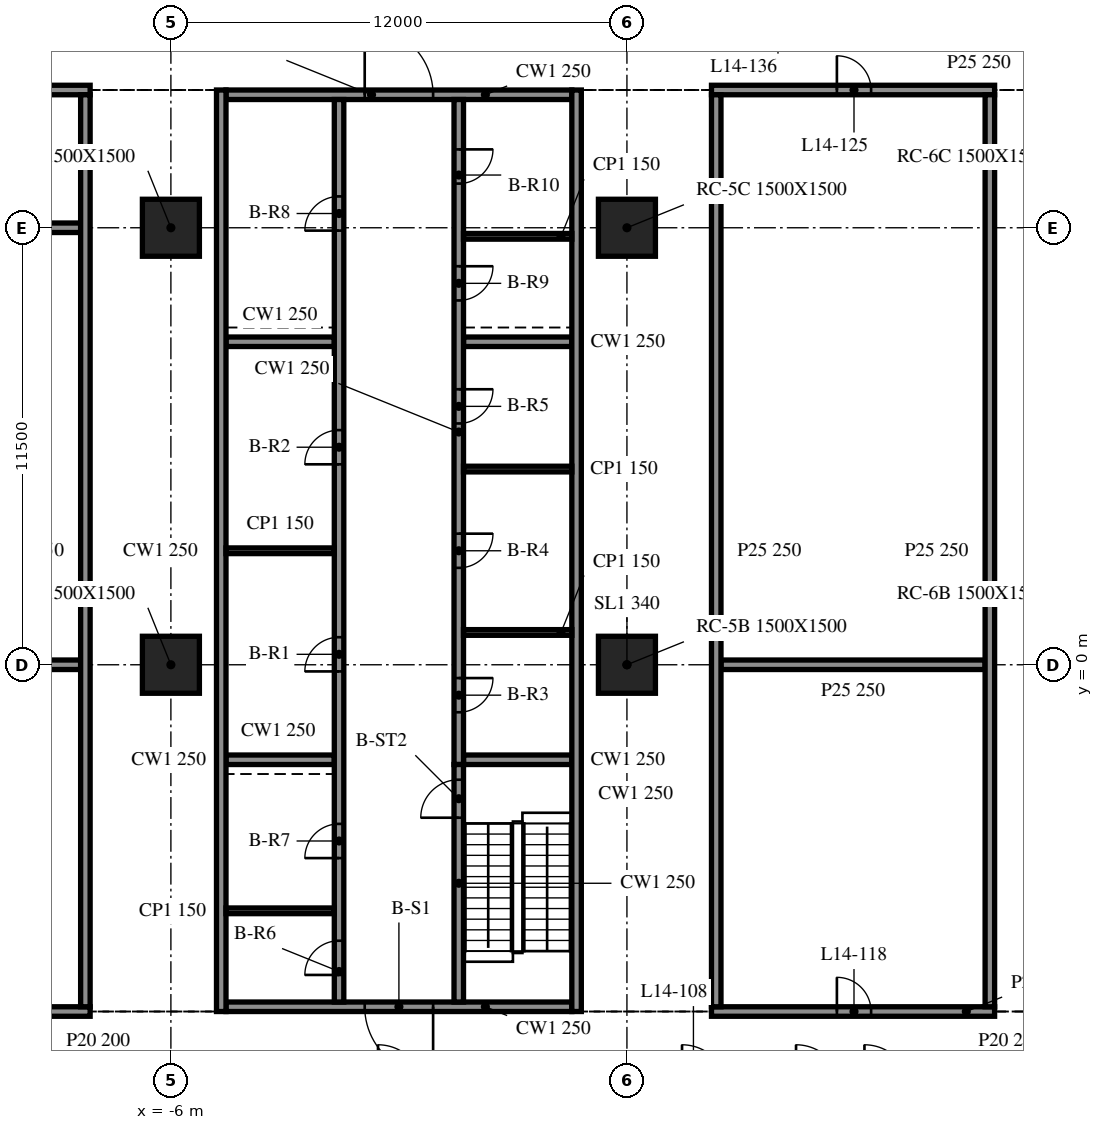
"""IFC4 building model, lengths in metres.
Left out: names, types, materials, properties, quantities, classifications, styles, units other than length and angle.
Written with IfcOpenShell. Run it as: python <this file> out.ifc"""

import sys

from ifc_helpers import new_model, si_unit, direction, frame, frame_2d, origin, origin_2d, place, context, subcontext, project, spatial, rectangle, extrude, element, fill, save


model = new_model("IFC4")
c1 = context("Model", 3, precision=1e-05, world=origin(), true_north=direction((0.0, 1.0)))
c2 = subcontext(c1, "Body", "Model", "MODEL_VIEW")
j1 = project(units=[si_unit("LENGTHUNIT", "METRE"), si_unit("PLANEANGLEUNIT", "RADIAN")], contexts=[c1])
p1 = place(None, origin())
s1 = spatial("IfcSite", under=j1, at=p1, CompositionType="ELEMENT")
p2 = place(p1, origin())
s2 = spatial("IfcBuilding", under=s1, at=p2, CompositionType="ELEMENT")
p3 = place(p2, frame((0.0, 0.0, 63.2)))
s3 = spatial("IfcBuildingStorey", under=s2, at=p3, CompositionType="ELEMENT", Elevation=63.2)
for number, where, z_axis, x_axis in (
    (1, (-6.0, 0.0, -0.34), (0.0, 0.0, 1.0), (1.0, 0.0, 0.0)),
    (2, (-6.0, 11.5, -0.34), (0.0, 0.0, 1.0), (1.0, 0.0, 0.0)),
    (3, (6.0, 0.0, -0.34), (0.0, 0.0, 1.0), (1.0, 0.0, 0.0)),
    (4, (6.0, 11.5, -0.34), (0.0, 0.0, 1.0), (1.0, 0.0, 0.0)),
):
    element("IfcColumn", number, at=place(p3, frame(where, z_axis=z_axis, x_axis=x_axis)), inside=s3, PredefinedType="COLUMN", context=c2, shape_type="SweptSolid", body=[
        extrude(rectangle(XDim=1.5, YDim=1.5, at=origin_2d()), origin(), (0.0, 0.0, 1.0), 4.3),
    ])
for number, where, z_axis, x_axis in (
    (5, (-4.675, 15.125, 0.0), (0.0, 0.0, 1.0), (0.0, -1.0, 0.0)),
    (6, (4.675, -9.125, 0.0), (0.0, 0.0, 1.0), (0.0, 1.0, 0.0)),
):
    element("IfcWall", number, at=place(p3, frame(where, z_axis=z_axis, x_axis=x_axis)), inside=s3, PredefinedType="SOLIDWALL", context=c2, shape_type="SweptSolid", body=[
        extrude(rectangle(XDim=24.25, YDim=0.25, at=frame_2d((12.125, 0.0))), origin(), (0.0, 0.0, 1.0), 3.96),
    ])
p4 = place(p3, frame((4.55, -9.0, 0.0), z_axis=(0.0, 0.0, 1.0), x_axis=(-1.0, 0.0, 0.0)))
e7 = element("IfcWall", 7, at=p4, inside=s3, PredefinedType="SOLIDWALL", context=c2, shape_type="SweptSolid", body=[
    extrude(rectangle(XDim=9.1, YDim=0.25, at=frame_2d((4.55, 0.0))), origin(), (0.0, 0.0, 1.0), 3.96),
])
p5 = place(p4, frame((3.65, 0.0, 0.0)))
e8 = element("IfcOpeningElement", 8, at=p5, cuts=e7, PredefinedType="OPENING", context=c2, shape_type="SweptSolid", body=[
    extrude(rectangle(XDim=1.8, YDim=2.1, at=frame_2d((0.9, 1.05))), frame((0.0, 0.135, 0.0), z_axis=(0.0, -1.0, 0.0), x_axis=(1.0, 0.0, 0.0)), (0.0, 0.0, 1.0), 0.27),
])
p6 = place(p3, frame((-4.55, 15.0, 0.0), z_axis=(0.0, 0.0, 1.0), x_axis=(1.0, 0.0, 0.0)))
e9 = element("IfcWall", 9, at=p6, inside=s3, PredefinedType="SOLIDWALL", context=c2, shape_type="SweptSolid", body=[
    extrude(rectangle(XDim=9.1, YDim=0.25, at=frame_2d((4.55, 0.0))), origin(), (0.0, 0.0, 1.0), 3.96),
])
p7 = place(p6, frame((3.65, 0.0, 0.0)))
e10 = element("IfcOpeningElement", 10, at=p7, cuts=e9, PredefinedType="OPENING", context=c2, shape_type="SweptSolid", body=[
    extrude(rectangle(XDim=1.8, YDim=2.1, at=frame_2d((0.9, 1.05))), frame((0.0, 0.135, 0.0), z_axis=(0.0, -1.0, 0.0), x_axis=(1.0, 0.0, 0.0)), (0.0, 0.0, 1.0), 0.27),
])
p8 = place(p3, frame((-1.575, -8.875, 0.0), z_axis=(0.0, 0.0, 1.0), x_axis=(0.0, 1.0, 0.0)))
e11 = element("IfcWall", 11, at=p8, inside=s3, PredefinedType="SOLIDWALL", context=c2, shape_type="SweptSolid", body=[
    extrude(rectangle(XDim=23.75, YDim=0.25, at=frame_2d((11.875, 0.0))), origin(), (0.0, 0.0, 1.0), 3.96),
])
p9 = place(p8, frame((8.7, 0.0, 0.0)))
e12 = element("IfcOpeningElement", 12, at=p9, cuts=e11, PredefinedType="OPENING", context=c2, shape_type="SweptSolid", body=[
    extrude(rectangle(XDim=0.9, YDim=2.1, at=frame_2d((0.45, 1.05))), frame((0.0, 0.135, 0.0), z_axis=(0.0, -1.0, 0.0), x_axis=(1.0, 0.0, 0.0)), (0.0, 0.0, 1.0), 0.27),
])
p10 = place(p8, frame((14.15, 0.0, 0.0)))
e13 = element("IfcOpeningElement", 13, at=p10, cuts=e11, PredefinedType="OPENING", context=c2, shape_type="SweptSolid", body=[
    extrude(rectangle(XDim=0.9, YDim=2.1, at=frame_2d((0.45, 1.05))), frame((0.0, 0.135, 0.0), z_axis=(0.0, -1.0, 0.0), x_axis=(1.0, 0.0, 0.0)), (0.0, 0.0, 1.0), 0.27),
])
p11 = place(p8, frame((0.712, 0.0, 0.0)))
e14 = element("IfcOpeningElement", 14, at=p11, cuts=e11, PredefinedType="OPENING", context=c2, shape_type="SweptSolid", body=[
    extrude(rectangle(XDim=0.9, YDim=2.1, at=frame_2d((0.45, 1.05))), frame((0.0, 0.135, 0.0), z_axis=(0.0, -1.0, 0.0), x_axis=(1.0, 0.0, 0.0)), (0.0, 0.0, 1.0), 0.27),
])
p12 = place(p8, frame((3.788, 0.0, 0.0)))
e15 = element("IfcOpeningElement", 15, at=p12, cuts=e11, PredefinedType="OPENING", context=c2, shape_type="SweptSolid", body=[
    extrude(rectangle(XDim=0.9, YDim=2.1, at=frame_2d((0.45, 1.05))), frame((0.0, 0.135, 0.0), z_axis=(0.0, -1.0, 0.0), x_axis=(1.0, 0.0, 0.0)), (0.0, 0.0, 1.0), 0.27),
])
p13 = place(p8, frame((20.3, 0.0, 0.0)))
e16 = element("IfcOpeningElement", 16, at=p13, cuts=e11, PredefinedType="OPENING", context=c2, shape_type="SweptSolid", body=[
    extrude(rectangle(XDim=0.9, YDim=2.1, at=frame_2d((0.45, 1.05))), frame((0.0, 0.135, 0.0), z_axis=(0.0, -1.0, 0.0), x_axis=(1.0, 0.0, 0.0)), (0.0, 0.0, 1.0), 0.27),
])
p14 = place(p3, frame((1.575, -8.875, 0.0), z_axis=(0.0, 0.0, 1.0), x_axis=(0.0, 1.0, 0.0)))
e17 = element("IfcWall", 17, at=p14, inside=s3, PredefinedType="SOLIDWALL", context=c2, shape_type="SweptSolid", body=[
    extrude(rectangle(XDim=6.25, YDim=0.25, at=frame_2d((3.125, 0.0))), origin(), (0.0, 0.0, 1.0), 3.96),
])
p15 = place(p14, frame((4.85, 0.0, 0.0)))
e18 = element("IfcOpeningElement", 18, at=p15, cuts=e17, PredefinedType="OPENING", context=c2, shape_type="SweptSolid", body=[
    extrude(rectangle(XDim=1.0, YDim=2.1, at=frame_2d((0.5, 1.05))), frame((0.0, 0.135, 0.0), z_axis=(0.0, -1.0, 0.0), x_axis=(1.0, 0.0, 0.0)), (0.0, 0.0, 1.0), 0.27),
])
p16 = place(p3, frame((1.575, 14.875, 0.0), z_axis=(0.0, 0.0, 1.0), x_axis=(0.0, -1.0, 0.0)))
e19 = element("IfcWall", 19, at=p16, inside=s3, PredefinedType="SOLIDWALL", context=c2, shape_type="SweptSolid", body=[
    extrude(rectangle(XDim=17.5, YDim=0.25, at=frame_2d((8.75, 0.0))), origin(), (0.0, 0.0, 1.0), 3.96),
])
p17 = place(p16, frame((15.225, 0.0, 0.0)))
e20 = element("IfcOpeningElement", 20, at=p17, cuts=e19, PredefinedType="OPENING", context=c2, shape_type="SweptSolid", body=[
    extrude(rectangle(XDim=0.9, YDim=2.1, at=frame_2d((0.45, 1.05))), frame((0.0, 0.135, 0.0), z_axis=(0.0, -1.0, 0.0), x_axis=(1.0, 0.0, 0.0)), (0.0, 0.0, 1.0), 0.27),
])
p18 = place(p16, frame((11.425, 0.0, 0.0)))
e21 = element("IfcOpeningElement", 21, at=p18, cuts=e19, PredefinedType="OPENING", context=c2, shape_type="SweptSolid", body=[
    extrude(rectangle(XDim=0.9, YDim=2.1, at=frame_2d((0.45, 1.05))), frame((0.0, 0.135, 0.0), z_axis=(0.0, -1.0, 0.0), x_axis=(1.0, 0.0, 0.0)), (0.0, 0.0, 1.0), 0.27),
])
p19 = place(p16, frame((7.625, 0.0, 0.0)))
e22 = element("IfcOpeningElement", 22, at=p19, cuts=e19, PredefinedType="OPENING", context=c2, shape_type="SweptSolid", body=[
    extrude(rectangle(XDim=0.9, YDim=2.1, at=frame_2d((0.45, 1.05))), frame((0.0, 0.135, 0.0), z_axis=(0.0, -1.0, 0.0), x_axis=(1.0, 0.0, 0.0)), (0.0, 0.0, 1.0), 0.27),
])
p20 = place(p16, frame((4.387, 0.0, 0.0)))
e23 = element("IfcOpeningElement", 23, at=p20, cuts=e19, PredefinedType="OPENING", context=c2, shape_type="SweptSolid", body=[
    extrude(rectangle(XDim=0.9, YDim=2.1, at=frame_2d((0.45, 1.05))), frame((0.0, 0.135, 0.0), z_axis=(0.0, -1.0, 0.0), x_axis=(1.0, 0.0, 0.0)), (0.0, 0.0, 1.0), 0.27),
])
p21 = place(p16, frame((1.312, 0.0, 0.0)))
e24 = element("IfcOpeningElement", 24, at=p21, cuts=e19, PredefinedType="OPENING", context=c2, shape_type="SweptSolid", body=[
    extrude(rectangle(XDim=0.9, YDim=2.1, at=frame_2d((0.45, 1.05))), frame((0.0, 0.135, 0.0), z_axis=(0.0, -1.0, 0.0), x_axis=(1.0, 0.0, 0.0)), (0.0, 0.0, 1.0), 0.27),
])
for number, where, z_axis, x_axis in (
    (25, (-4.55, -2.5, 0.0), (0.0, 0.0, 1.0), (1.0, 0.0, 0.0)),
    (26, (-4.55, 8.5, 0.0), (0.0, 0.0, 1.0), (1.0, 0.0, 0.0)),
    (27, (1.7, -2.5, 0.0), (0.0, 0.0, 1.0), (1.0, 0.0, 0.0)),
    (28, (1.7, 8.5, 0.0), (0.0, 0.0, 1.0), (1.0, 0.0, 0.0)),
):
    element("IfcWall", number, at=place(p3, frame(where, z_axis=z_axis, x_axis=x_axis)), inside=s3, PredefinedType="SOLIDWALL", context=c2, shape_type="SweptSolid", body=[
        extrude(rectangle(XDim=2.85, YDim=0.25, at=frame_2d((1.425, 0.0))), origin(), (0.0, 0.0, 1.0), 3.96),
    ])
for number, where, z_axis, x_axis in (
    (29, (-4.55, 3.0, 0.0), (0.0, 0.0, 1.0), (1.0, 0.0, 0.0)),
    (30, (1.7, 0.85, 0.0), (0.0, 0.0, 1.0), (1.0, 0.0, 0.0)),
    (31, (1.7, 5.15, 0.0), (0.0, 0.0, 1.0), (1.0, 0.0, 0.0)),
    (32, (-4.55, -6.475, 0.0), (0.0, 0.0, 1.0), (1.0, 0.0, 0.0)),
    (33, (1.7, 11.275, 0.0), (0.0, 0.0, 1.0), (1.0, 0.0, 0.0)),
):
    element("IfcWall", number, at=place(p3, frame(where, z_axis=z_axis, x_axis=x_axis)), inside=s3, PredefinedType="PARTITIONING", context=c2, shape_type="SweptSolid", body=[
        extrude(rectangle(XDim=2.85, YDim=0.15, at=frame_2d((1.425, 0.0))), origin(), (0.0, 0.0, 1.0), 3.96),
    ])
p22 = place(p3, frame((-15.975, -9.125, 0.0), z_axis=(0.0, 0.0, 1.0), x_axis=(1.0, 0.0, 0.0)))
e34 = element("IfcWall", 34, at=p22, inside=s3, PredefinedType="PARTITIONING", context=c2, shape_type="SweptSolid", body=[
    extrude(rectangle(XDim=7.85, YDim=0.25, at=frame_2d((3.925, 0.0))), origin(), (0.0, 0.0, 1.0), 3.96),
])
p23 = place(p22, frame((3.5, 0.0, 0.0)))
e35 = element("IfcOpeningElement", 35, at=p23, cuts=e34, PredefinedType="OPENING", context=c2, shape_type="SweptSolid", body=[
    extrude(rectangle(XDim=0.9, YDim=2.1, at=frame_2d((0.45, 1.05))), frame((0.0, 0.135, 0.0), z_axis=(0.0, -1.0, 0.0), x_axis=(1.0, 0.0, 0.0)), (0.0, 0.0, 1.0), 0.27),
])
p24 = place(p3, frame((8.225, -9.125, 0.0), z_axis=(0.0, 0.0, 1.0), x_axis=(1.0, 0.0, 0.0)))
e36 = element("IfcWall", 36, at=p24, inside=s3, PredefinedType="PARTITIONING", context=c2, shape_type="SweptSolid", body=[
    extrude(rectangle(XDim=7.45, YDim=0.25, at=frame_2d((3.725, 0.0))), origin(), (0.0, 0.0, 1.0), 3.96),
])
p25 = place(p24, frame((3.3, 0.0, 0.0)))
e37 = element("IfcOpeningElement", 37, at=p25, cuts=e36, PredefinedType="OPENING", context=c2, shape_type="SweptSolid", body=[
    extrude(rectangle(XDim=0.9, YDim=2.1, at=frame_2d((0.45, 1.05))), frame((0.0, 0.135, 0.0), z_axis=(0.0, -1.0, 0.0), x_axis=(1.0, 0.0, 0.0)), (0.0, 0.0, 1.0), 0.27),
])
p26 = place(p3, frame((-15.725, 0.0, 0.0), z_axis=(0.0, 0.0, 1.0), x_axis=(1.0, 0.0, 0.0)))
e38 = element("IfcWall", 38, at=p26, inside=s3, PredefinedType="PARTITIONING", context=c2, shape_type="SweptSolid", body=[
    extrude(rectangle(XDim=7.35, YDim=0.25, at=frame_2d((3.675, 0.0))), origin(), (0.0, 0.0, 1.0), 3.96),
])
p27 = place(p3, frame((8.475, 0.0, 0.0), z_axis=(0.0, 0.0, 1.0), x_axis=(1.0, 0.0, 0.0)))
e39 = element("IfcWall", 39, at=p27, inside=s3, PredefinedType="PARTITIONING", context=c2, shape_type="SweptSolid", body=[
    extrude(rectangle(XDim=6.95, YDim=0.25, at=frame_2d((3.475, 0.0))), origin(), (0.0, 0.0, 1.0), 3.96),
])
p28 = place(p3, frame((-15.725, 11.5, 0.0), z_axis=(0.0, 0.0, 1.0), x_axis=(1.0, 0.0, 0.0)))
e40 = element("IfcWall", 40, at=p28, inside=s3, PredefinedType="PARTITIONING", context=c2, shape_type="SweptSolid", body=[
    extrude(rectangle(XDim=7.35, YDim=0.25, at=frame_2d((3.675, 0.0))), origin(), (0.0, 0.0, 1.0), 3.96),
])
p29 = place(p3, frame((-15.975, 15.125, 0.0), z_axis=(0.0, 0.0, 1.0), x_axis=(1.0, 0.0, 0.0)))
e41 = element("IfcWall", 41, at=p29, inside=s3, PredefinedType="PARTITIONING", context=c2, shape_type="SweptSolid", body=[
    extrude(rectangle(XDim=7.85, YDim=0.25, at=frame_2d((3.925, 0.0))), origin(), (0.0, 0.0, 1.0), 3.96),
])
p30 = place(p29, frame((3.5, 0.0, 0.0)))
e42 = element("IfcOpeningElement", 42, at=p30, cuts=e41, PredefinedType="OPENING", context=c2, shape_type="SweptSolid", body=[
    extrude(rectangle(XDim=0.9, YDim=2.1, at=frame_2d((0.45, 1.05))), frame((0.0, 0.135, 0.0), z_axis=(0.0, -1.0, 0.0), x_axis=(1.0, 0.0, 0.0)), (0.0, 0.0, 1.0), 0.27),
])
p31 = place(p3, frame((8.225, 15.125, 0.0), z_axis=(0.0, 0.0, 1.0), x_axis=(1.0, 0.0, 0.0)))
e43 = element("IfcWall", 43, at=p31, inside=s3, PredefinedType="PARTITIONING", context=c2, shape_type="SweptSolid", body=[
    extrude(rectangle(XDim=7.45, YDim=0.25, at=frame_2d((3.725, 0.0))), origin(), (0.0, 0.0, 1.0), 3.96),
])
p32 = place(p31, frame((3.3, 0.0, 0.0)))
e44 = element("IfcOpeningElement", 44, at=p32, cuts=e43, PredefinedType="OPENING", context=c2, shape_type="SweptSolid", body=[
    extrude(rectangle(XDim=0.9, YDim=2.1, at=frame_2d((0.45, 1.05))), frame((0.0, 0.135, 0.0), z_axis=(0.0, -1.0, 0.0), x_axis=(1.0, 0.0, 0.0)), (0.0, 0.0, 1.0), 0.27),
])
for number, where, z_axis, x_axis in (
    (45, (-8.25, -9.0, 0.0), (0.0, 0.0, 1.0), (0.0, 1.0, 0.0)),
    (46, (8.35, -9.0, 0.0), (0.0, 0.0, 1.0), (0.0, 1.0, 0.0)),
    (47, (15.55, -9.0, 0.0), (0.0, 0.0, 1.0), (0.0, 1.0, 0.0)),
):
    element("IfcWall", number, at=place(p3, frame(where, z_axis=z_axis, x_axis=x_axis)), inside=s3, PredefinedType="PARTITIONING", context=c2, shape_type="SweptSolid", body=[
        extrude(rectangle(XDim=24.0, YDim=0.25, at=frame_2d((12.0, 0.0))), origin(), (0.0, 0.0, 1.0), 3.96),
    ])
p33 = place(p5, origin())
e48 = element("IfcDoor", 48, at=p33, inside=s3, OperationType="DOUBLE_DOOR_SINGLE_SWING", PredefinedType="DOOR", context=c2, shape_type="SweptSolid", body=[
    extrude(rectangle(XDim=1.8, YDim=2.1, at=frame_2d((0.9, 1.05))), frame((0.0, 0.025, 0.0), z_axis=(0.0, -1.0, 0.0), x_axis=(1.0, 0.0, 0.0)), (0.0, 0.0, 1.0), 0.05),
])
fill(e8, e48)
p34 = place(p7, origin())
e49 = element("IfcDoor", 49, at=p34, inside=s3, OperationType="DOUBLE_DOOR_SINGLE_SWING", PredefinedType="DOOR", context=c2, shape_type="SweptSolid", body=[
    extrude(rectangle(XDim=1.8, YDim=2.1, at=frame_2d((0.9, 1.05))), frame((0.0, 0.025, 0.0), z_axis=(0.0, -1.0, 0.0), x_axis=(1.0, 0.0, 0.0)), (0.0, 0.0, 1.0), 0.05),
])
fill(e10, e49)
p35 = place(p9, origin())
e50 = element("IfcDoor", 50, at=p35, inside=s3, OperationType="SINGLE_SWING_LEFT", PredefinedType="DOOR", context=c2, shape_type="SweptSolid", body=[
    extrude(rectangle(XDim=0.9, YDim=2.1, at=frame_2d((0.45, 1.05))), frame((0.0, 0.025, 0.0), z_axis=(0.0, -1.0, 0.0), x_axis=(1.0, 0.0, 0.0)), (0.0, 0.0, 1.0), 0.05),
])
fill(e12, e50)
p36 = place(p10, origin())
e51 = element("IfcDoor", 51, at=p36, inside=s3, OperationType="SINGLE_SWING_RIGHT", PredefinedType="DOOR", context=c2, shape_type="SweptSolid", body=[
    extrude(rectangle(XDim=0.9, YDim=2.1, at=frame_2d((0.45, 1.05))), frame((0.0, 0.025, 0.0), z_axis=(0.0, -1.0, 0.0), x_axis=(1.0, 0.0, 0.0)), (0.0, 0.0, 1.0), 0.05),
])
fill(e13, e51)
p37 = place(p17, origin())
e52 = element("IfcDoor", 52, at=p37, inside=s3, OperationType="SINGLE_SWING_LEFT", PredefinedType="DOOR", context=c2, shape_type="SweptSolid", body=[
    extrude(rectangle(XDim=0.9, YDim=2.1, at=frame_2d((0.45, 1.05))), frame((0.0, 0.025, 0.0), z_axis=(0.0, -1.0, 0.0), x_axis=(1.0, 0.0, 0.0)), (0.0, 0.0, 1.0), 0.05),
])
fill(e20, e52)
p38 = place(p18, origin())
e53 = element("IfcDoor", 53, at=p38, inside=s3, OperationType="SINGLE_SWING_RIGHT", PredefinedType="DOOR", context=c2, shape_type="SweptSolid", body=[
    extrude(rectangle(XDim=0.9, YDim=2.1, at=frame_2d((0.45, 1.05))), frame((0.0, 0.025, 0.0), z_axis=(0.0, -1.0, 0.0), x_axis=(1.0, 0.0, 0.0)), (0.0, 0.0, 1.0), 0.05),
])
fill(e21, e53)
p39 = place(p19, origin())
e54 = element("IfcDoor", 54, at=p39, inside=s3, OperationType="SINGLE_SWING_LEFT", PredefinedType="DOOR", context=c2, shape_type="SweptSolid", body=[
    extrude(rectangle(XDim=0.9, YDim=2.1, at=frame_2d((0.45, 1.05))), frame((0.0, 0.025, 0.0), z_axis=(0.0, -1.0, 0.0), x_axis=(1.0, 0.0, 0.0)), (0.0, 0.0, 1.0), 0.05),
])
fill(e22, e54)
p40 = place(p11, origin())
e55 = element("IfcDoor", 55, at=p40, inside=s3, OperationType="SINGLE_SWING_RIGHT", PredefinedType="DOOR", context=c2, shape_type="SweptSolid", body=[
    extrude(rectangle(XDim=0.9, YDim=2.1, at=frame_2d((0.45, 1.05))), frame((0.0, 0.025, 0.0), z_axis=(0.0, -1.0, 0.0), x_axis=(1.0, 0.0, 0.0)), (0.0, 0.0, 1.0), 0.05),
])
fill(e14, e55)
p41 = place(p12, origin())
e56 = element("IfcDoor", 56, at=p41, inside=s3, OperationType="SINGLE_SWING_LEFT", PredefinedType="DOOR", context=c2, shape_type="SweptSolid", body=[
    extrude(rectangle(XDim=0.9, YDim=2.1, at=frame_2d((0.45, 1.05))), frame((0.0, 0.025, 0.0), z_axis=(0.0, -1.0, 0.0), x_axis=(1.0, 0.0, 0.0)), (0.0, 0.0, 1.0), 0.05),
])
fill(e15, e56)
p42 = place(p13, origin())
e57 = element("IfcDoor", 57, at=p42, inside=s3, OperationType="SINGLE_SWING_RIGHT", PredefinedType="DOOR", context=c2, shape_type="SweptSolid", body=[
    extrude(rectangle(XDim=0.9, YDim=2.1, at=frame_2d((0.45, 1.05))), frame((0.0, 0.025, 0.0), z_axis=(0.0, -1.0, 0.0), x_axis=(1.0, 0.0, 0.0)), (0.0, 0.0, 1.0), 0.05),
])
fill(e16, e57)
p43 = place(p20, origin())
e58 = element("IfcDoor", 58, at=p43, inside=s3, OperationType="SINGLE_SWING_LEFT", PredefinedType="DOOR", context=c2, shape_type="SweptSolid", body=[
    extrude(rectangle(XDim=0.9, YDim=2.1, at=frame_2d((0.45, 1.05))), frame((0.0, 0.025, 0.0), z_axis=(0.0, -1.0, 0.0), x_axis=(1.0, 0.0, 0.0)), (0.0, 0.0, 1.0), 0.05),
])
fill(e23, e58)
p44 = place(p21, origin())
e59 = element("IfcDoor", 59, at=p44, inside=s3, OperationType="SINGLE_SWING_RIGHT", PredefinedType="DOOR", context=c2, shape_type="SweptSolid", body=[
    extrude(rectangle(XDim=0.9, YDim=2.1, at=frame_2d((0.45, 1.05))), frame((0.0, 0.025, 0.0), z_axis=(0.0, -1.0, 0.0), x_axis=(1.0, 0.0, 0.0)), (0.0, 0.0, 1.0), 0.05),
])
fill(e24, e59)
p45 = place(p15, origin())
e60 = element("IfcDoor", 60, at=p45, inside=s3, OperationType="SINGLE_SWING_LEFT", PredefinedType="DOOR", context=c2, shape_type="SweptSolid", body=[
    extrude(rectangle(XDim=1.0, YDim=2.1, at=frame_2d((0.5, 1.05))), frame((0.0, 0.025, 0.0), z_axis=(0.0, -1.0, 0.0), x_axis=(1.0, 0.0, 0.0)), (0.0, 0.0, 1.0), 0.05),
])
fill(e18, e60)
p46 = place(p25, origin())
e61 = element("IfcDoor", 61, at=p46, inside=s3, OperationType="SINGLE_SWING_RIGHT", PredefinedType="DOOR", context=c2, shape_type="SweptSolid", body=[
    extrude(rectangle(XDim=0.9, YDim=2.1, at=frame_2d((0.45, 1.05))), frame((0.0, 0.025, 0.0), z_axis=(0.0, -1.0, 0.0), x_axis=(1.0, 0.0, 0.0)), (0.0, 0.0, 1.0), 0.05),
])
fill(e37, e61)
p47 = place(p32, origin())
e62 = element("IfcDoor", 62, at=p47, inside=s3, OperationType="SINGLE_SWING_LEFT", PredefinedType="DOOR", context=c2, shape_type="SweptSolid", body=[
    extrude(rectangle(XDim=0.9, YDim=2.1, at=frame_2d((0.45, 1.05))), frame((0.0, 0.025, 0.0), z_axis=(0.0, -1.0, 0.0), x_axis=(1.0, 0.0, 0.0)), (0.0, 0.0, 1.0), 0.05),
])
fill(e44, e62)
save(model, sys.argv[1])
